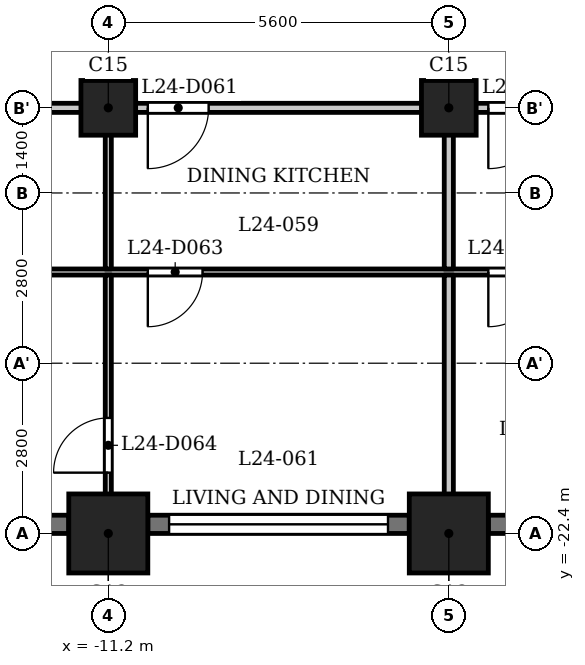
"""IFC4 building model, lengths in metres.
Left out: names, types, materials, properties, quantities, classifications, styles, units other than length and angle.
Written with IfcOpenShell. Run it as: python <this file> out.ifc"""

import sys

from ifc_helpers import new_model, si_unit, direction, frame, frame_2d, origin, origin_2d, place, context, subcontext, project, spatial, rectangle, extrude, element, fill, save


model = new_model("IFC4")
c1 = context("Model", 3, precision=1e-05, world=origin(), true_north=direction((0.0, 1.0)))
c2 = subcontext(c1, "Body", "Model", "MODEL_VIEW")
j1 = project(units=[si_unit("LENGTHUNIT", "METRE"), si_unit("PLANEANGLEUNIT", "RADIAN")], contexts=[c1])
p1 = place(None, origin())
s1 = spatial("IfcSite", under=j1, at=p1, CompositionType="ELEMENT")
p2 = place(p1, origin())
s2 = spatial("IfcBuilding", under=s1, at=p2, CompositionType="ELEMENT")
p3 = place(p2, frame((0.0, 0.0, 97.3)))
s3 = spatial("IfcBuildingStorey", under=s2, at=p3, CompositionType="ELEMENT", Elevation=97.3)
for number, where, z_axis, x_axis in (
    (1, (-11.2, -22.4, 0.0), (0.0, 0.0, 1.0), (1.0, 0.0, 0.0)),
    (2, (-5.6, -22.4, 0.0), (0.0, 0.0, 1.0), (1.0, 0.0, 0.0)),
):
    element("IfcColumn", number, at=place(p3, frame(where, z_axis=z_axis, x_axis=x_axis)), inside=s3, PredefinedType="COLUMN", context=c2, shape_type="SweptSolid", body=[
        extrude(rectangle(XDim=1.3, YDim=1.3, at=origin_2d()), origin(), (0.0, 0.0, 1.0), 3.5),
    ])
for number, where, z_axis, x_axis in (
    (3, (-11.2, -15.4, 0.0), (0.0, 0.0, 1.0), (1.0, 0.0, 0.0)),
    (4, (-5.6, -15.4, 0.0), (0.0, 0.0, 1.0), (1.0, 0.0, 0.0)),
):
    element("IfcColumn", number, at=place(p3, frame(where, z_axis=z_axis, x_axis=x_axis)), inside=s3, PredefinedType="COLUMN", context=c2, shape_type="SweptSolid", body=[
        extrude(rectangle(XDim=0.9, YDim=0.9, at=origin_2d()), origin(), (0.0, 0.0, 1.0), 3.5),
    ])
p4 = place(p3, frame((-16.15, -22.25, 0.0), z_axis=(0.0, 0.0, 1.0), x_axis=(1.0, 0.0, 0.0)))
e5 = element("IfcWall", 5, at=p4, inside=s3, PredefinedType="SOLIDWALL", context=c2, shape_type="SweptSolid", body=[
    extrude(rectangle(XDim=4.3, YDim=0.3, at=frame_2d((2.15, 0.0))), origin(), (0.0, 0.0, 1.0), 2.4),
])
p5 = place(p4, frame((0.35, 0.0, 1.2)))
e6 = element("IfcOpeningElement", 6, at=p5, cuts=e5, PredefinedType="OPENING", context=c2, shape_type="SweptSolid", body=[
    extrude(rectangle(XDim=3.6, YDim=0.95, at=frame_2d((1.8, 0.475))), frame((0.0, 0.16, 0.0), z_axis=(0.0, -1.0, 0.0), x_axis=(1.0, 0.0, 0.0)), (0.0, 0.0, 1.0), 0.32),
])
p6 = place(p3, frame((-10.55, -22.25, 0.0), z_axis=(0.0, 0.0, 1.0), x_axis=(1.0, 0.0, 0.0)))
e7 = element("IfcWall", 7, at=p6, inside=s3, PredefinedType="SOLIDWALL", context=c2, shape_type="SweptSolid", body=[
    extrude(rectangle(XDim=4.3, YDim=0.3, at=frame_2d((2.15, 0.0))), origin(), (0.0, 0.0, 1.0), 2.4),
])
p7 = place(p6, frame((0.35, 0.0, 1.2)))
e8 = element("IfcOpeningElement", 8, at=p7, cuts=e7, PredefinedType="OPENING", context=c2, shape_type="SweptSolid", body=[
    extrude(rectangle(XDim=3.6, YDim=0.95, at=frame_2d((1.8, 0.475))), frame((0.0, 0.16, 0.0), z_axis=(0.0, -1.0, 0.0), x_axis=(1.0, 0.0, 0.0)), (0.0, 0.0, 1.0), 0.32),
])
p8 = place(p3, frame((-4.95, -22.25, 0.0), z_axis=(0.0, 0.0, 1.0), x_axis=(1.0, 0.0, 0.0)))
e9 = element("IfcWall", 9, at=p8, inside=s3, PredefinedType="SOLIDWALL", context=c2, shape_type="SweptSolid", body=[
    extrude(rectangle(XDim=4.3, YDim=0.3, at=frame_2d((2.15, 0.0))), origin(), (0.0, 0.0, 1.0), 2.4),
])
p9 = place(p8, frame((0.35, 0.0, 1.2)))
e10 = element("IfcOpeningElement", 10, at=p9, cuts=e9, PredefinedType="OPENING", context=c2, shape_type="SweptSolid", body=[
    extrude(rectangle(XDim=3.6, YDim=0.95, at=frame_2d((1.8, 0.475))), frame((0.0, 0.16, 0.0), z_axis=(0.0, -1.0, 0.0), x_axis=(1.0, 0.0, 0.0)), (0.0, 0.0, 1.0), 0.32),
])
p10 = place(p3, frame((-26.19, -18.1, 0.0), z_axis=(0.0, 0.0, 1.0), x_axis=(1.0, 0.0, 0.0)))
e11 = element("IfcWall", 11, at=p10, inside=s3, PredefinedType="PARTITIONING", context=c2, shape_type="SweptSolid", body=[
    extrude(rectangle(XDim=52.63, YDim=0.1, at=frame_2d((26.315, 0.0))), origin(), (0.0, 0.0, 1.0), 3.2),
])
p11 = place(p10, frame((1.09, 0.0, 0.0)))
e12 = element("IfcOpeningElement", 12, at=p11, cuts=e11, PredefinedType="OPENING", context=c2, shape_type="SweptSolid", body=[
    extrude(rectangle(XDim=0.8, YDim=2.1, at=frame_2d((0.4, 1.05))), frame((0.0, 0.06, 0.0), z_axis=(0.0, -1.0, 0.0), x_axis=(1.0, 0.0, 0.0)), (0.0, 0.0, 1.0), 0.12),
])
p12 = place(p10, frame((4.44, 0.0, 0.0)))
e13 = element("IfcOpeningElement", 13, at=p12, cuts=e11, PredefinedType="OPENING", context=c2, shape_type="SweptSolid", body=[
    extrude(rectangle(XDim=0.9, YDim=2.1, at=frame_2d((0.45, 1.05))), frame((0.0, 0.06, 0.0), z_axis=(0.0, -1.0, 0.0), x_axis=(1.0, 0.0, 0.0)), (0.0, 0.0, 1.0), 0.12),
])
p13 = place(p10, frame((10.04, 0.0, 0.0)))
e14 = element("IfcOpeningElement", 14, at=p13, cuts=e11, PredefinedType="OPENING", context=c2, shape_type="SweptSolid", body=[
    extrude(rectangle(XDim=0.8, YDim=2.1, at=frame_2d((0.4, 1.05))), frame((0.0, 0.06, 0.0), z_axis=(0.0, -1.0, 0.0), x_axis=(1.0, 0.0, 0.0)), (0.0, 0.0, 1.0), 0.12),
])
p14 = place(p10, frame((15.64, 0.0, 0.0)))
e15 = element("IfcOpeningElement", 15, at=p14, cuts=e11, PredefinedType="OPENING", context=c2, shape_type="SweptSolid", body=[
    extrude(rectangle(XDim=0.9, YDim=2.1, at=frame_2d((0.45, 1.05))), frame((0.0, 0.06, 0.0), z_axis=(0.0, -1.0, 0.0), x_axis=(1.0, 0.0, 0.0)), (0.0, 0.0, 1.0), 0.12),
])
p15 = place(p10, frame((24.74, 0.0, 0.0)))
e16 = element("IfcOpeningElement", 16, at=p15, cuts=e11, PredefinedType="OPENING", context=c2, shape_type="SweptSolid", body=[
    extrude(rectangle(XDim=0.8, YDim=2.1, at=frame_2d((0.4, 1.05))), frame((0.0, 0.06, 0.0), z_axis=(0.0, -1.0, 0.0), x_axis=(1.0, 0.0, 0.0)), (0.0, 0.0, 1.0), 0.12),
])
p16 = place(p10, frame((21.24, 0.0, 0.0)))
e17 = element("IfcOpeningElement", 17, at=p16, cuts=e11, PredefinedType="OPENING", context=c2, shape_type="SweptSolid", body=[
    extrude(rectangle(XDim=0.9, YDim=2.1, at=frame_2d((0.45, 1.05))), frame((0.0, 0.06, 0.0), z_axis=(0.0, -1.0, 0.0), x_axis=(1.0, 0.0, 0.0)), (0.0, 0.0, 1.0), 0.12),
])
p17 = place(p10, frame((35.94, 0.0, 0.0)))
e18 = element("IfcOpeningElement", 18, at=p17, cuts=e11, PredefinedType="OPENING", context=c2, shape_type="SweptSolid", body=[
    extrude(rectangle(XDim=0.8, YDim=2.1, at=frame_2d((0.4, 1.05))), frame((0.0, 0.06, 0.0), z_axis=(0.0, -1.0, 0.0), x_axis=(1.0, 0.0, 0.0)), (0.0, 0.0, 1.0), 0.12),
])
p18 = place(p10, frame((33.19, 0.0, 0.0)))
e19 = element("IfcOpeningElement", 19, at=p18, cuts=e11, PredefinedType="OPENING", context=c2, shape_type="SweptSolid", body=[
    extrude(rectangle(XDim=0.9, YDim=2.1, at=frame_2d((0.45, 1.05))), frame((0.0, 0.06, 0.0), z_axis=(0.0, -1.0, 0.0), x_axis=(1.0, 0.0, 0.0)), (0.0, 0.0, 1.0), 0.12),
])
p19 = place(p10, frame((27.59, 0.0, 0.0)))
e20 = element("IfcOpeningElement", 20, at=p19, cuts=e11, PredefinedType="OPENING", context=c2, shape_type="SweptSolid", body=[
    extrude(rectangle(XDim=0.9, YDim=2.1, at=frame_2d((0.45, 1.05))), frame((0.0, 0.06, 0.0), z_axis=(0.0, -1.0, 0.0), x_axis=(1.0, 0.0, 0.0)), (0.0, 0.0, 1.0), 0.12),
])
p20 = place(p10, frame((29.64, 0.0, 0.0)))
e21 = element("IfcOpeningElement", 21, at=p20, cuts=e11, PredefinedType="OPENING", context=c2, shape_type="SweptSolid", body=[
    extrude(rectangle(XDim=0.9, YDim=2.1, at=frame_2d((0.45, 1.05))), frame((0.0, 0.06, 0.0), z_axis=(0.0, -1.0, 0.0), x_axis=(1.0, 0.0, 0.0)), (0.0, 0.0, 1.0), 0.12),
])
p21 = place(p10, frame((41.54, 0.0, 0.0)))
e22 = element("IfcOpeningElement", 22, at=p21, cuts=e11, PredefinedType="OPENING", context=c2, shape_type="SweptSolid", body=[
    extrude(rectangle(XDim=0.8, YDim=2.1, at=frame_2d((0.4, 1.05))), frame((0.0, 0.06, 0.0), z_axis=(0.0, -1.0, 0.0), x_axis=(1.0, 0.0, 0.0)), (0.0, 0.0, 1.0), 0.12),
])
p22 = place(p10, frame((38.54, 0.0, 0.0)))
e23 = element("IfcOpeningElement", 23, at=p22, cuts=e11, PredefinedType="OPENING", context=c2, shape_type="SweptSolid", body=[
    extrude(rectangle(XDim=0.9, YDim=2.1, at=frame_2d((0.45, 1.05))), frame((0.0, 0.06, 0.0), z_axis=(0.0, -1.0, 0.0), x_axis=(1.0, 0.0, 0.0)), (0.0, 0.0, 1.0), 0.12),
])
p23 = place(p10, frame((49.204, 0.0, 0.0)))
e24 = element("IfcOpeningElement", 24, at=p23, cuts=e11, PredefinedType="OPENING", context=c2, shape_type="SweptSolid", body=[
    extrude(rectangle(XDim=0.8, YDim=2.1, at=frame_2d((0.4, 1.05))), frame((0.0, 0.06, 0.0), z_axis=(0.0, -1.0, 0.0), x_axis=(1.0, 0.0, 0.0)), (0.0, 0.0, 1.0), 0.12),
])
p24 = place(p10, frame((43.64, 0.0, 0.0)))
e25 = element("IfcOpeningElement", 25, at=p24, cuts=e11, PredefinedType="OPENING", context=c2, shape_type="SweptSolid", body=[
    extrude(rectangle(XDim=0.9, YDim=2.1, at=frame_2d((0.45, 1.05))), frame((0.0, 0.06, 0.0), z_axis=(0.0, -1.0, 0.0), x_axis=(1.0, 0.0, 0.0)), (0.0, 0.0, 1.0), 0.12),
])
p25 = place(p3, frame((-27.484, -15.4, 0.0), z_axis=(0.0, 0.0, 1.0), x_axis=(1.0, 0.0, 0.0)))
e26 = element("IfcWall", 26, at=p25, inside=s3, PredefinedType="PARTITIONING", context=c2, shape_type="SweptSolid", body=[
    extrude(rectangle(XDim=54.968, YDim=0.15, at=frame_2d((27.484, 0.0))), origin(), (0.0, 0.0, 1.0), 3.2),
])
p26 = place(p25, frame((5.734, 0.0, 0.0)))
e27 = element("IfcOpeningElement", 27, at=p26, cuts=e26, PredefinedType="OPENING", context=c2, shape_type="SweptSolid", body=[
    extrude(rectangle(XDim=1.0, YDim=2.1, at=frame_2d((0.5, 1.05))), frame((0.0, 0.085, 0.0), z_axis=(0.0, -1.0, 0.0), x_axis=(1.0, 0.0, 0.0)), (0.0, 0.0, 1.0), 0.17),
])
p27 = place(p25, frame((16.934, 0.0, 0.0)))
e28 = element("IfcOpeningElement", 28, at=p27, cuts=e26, PredefinedType="OPENING", context=c2, shape_type="SweptSolid", body=[
    extrude(rectangle(XDim=1.0, YDim=2.1, at=frame_2d((0.5, 1.05))), frame((0.0, 0.085, 0.0), z_axis=(0.0, -1.0, 0.0), x_axis=(1.0, 0.0, 0.0)), (0.0, 0.0, 1.0), 0.17),
])
p28 = place(p25, frame((22.534, 0.0, 0.0)))
e29 = element("IfcOpeningElement", 29, at=p28, cuts=e26, PredefinedType="OPENING", context=c2, shape_type="SweptSolid", body=[
    extrude(rectangle(XDim=1.0, YDim=2.1, at=frame_2d((0.5, 1.05))), frame((0.0, 0.085, 0.0), z_axis=(0.0, -1.0, 0.0), x_axis=(1.0, 0.0, 0.0)), (0.0, 0.0, 1.0), 0.17),
])
p29 = place(p25, frame((31.384, 0.0, 0.0)))
e30 = element("IfcOpeningElement", 30, at=p29, cuts=e26, PredefinedType="OPENING", context=c2, shape_type="SweptSolid", body=[
    extrude(rectangle(XDim=1.0, YDim=2.1, at=frame_2d((0.5, 1.05))), frame((0.0, 0.085, 0.0), z_axis=(0.0, -1.0, 0.0), x_axis=(1.0, 0.0, 0.0)), (0.0, 0.0, 1.0), 0.17),
])
p30 = place(p25, frame((39.584, 0.0, 0.0)))
e31 = element("IfcOpeningElement", 31, at=p30, cuts=e26, PredefinedType="OPENING", context=c2, shape_type="SweptSolid", body=[
    extrude(rectangle(XDim=1.0, YDim=2.1, at=frame_2d((0.5, 1.05))), frame((0.0, 0.085, 0.0), z_axis=(0.0, -1.0, 0.0), x_axis=(1.0, 0.0, 0.0)), (0.0, 0.0, 1.0), 0.17),
])
p31 = place(p25, frame((44.934, 0.0, 0.0)))
e32 = element("IfcOpeningElement", 32, at=p31, cuts=e26, PredefinedType="OPENING", context=c2, shape_type="SweptSolid", body=[
    extrude(rectangle(XDim=1.0, YDim=2.1, at=frame_2d((0.5, 1.05))), frame((0.0, 0.085, 0.0), z_axis=(0.0, -1.0, 0.0), x_axis=(1.0, 0.0, 0.0)), (0.0, 0.0, 1.0), 0.17),
])
p32 = place(p3, frame((-11.2, -23.03, 0.0), z_axis=(0.0, 0.0, 1.0), x_axis=(0.0, 1.0, 0.0)))
e33 = element("IfcWall", 33, at=p32, inside=s3, PredefinedType="PARTITIONING", context=c2, shape_type="SweptSolid", body=[
    extrude(rectangle(XDim=4.88, YDim=0.1, at=frame_2d((2.44, 0.0))), origin(), (0.0, 0.0, 1.0), 3.2),
])
p33 = place(p32, frame((1.63, 0.0, 0.0)))
e34 = element("IfcOpeningElement", 34, at=p33, cuts=e33, PredefinedType="OPENING", context=c2, shape_type="SweptSolid", body=[
    extrude(rectangle(XDim=0.9, YDim=2.1, at=frame_2d((0.45, 1.05))), frame((0.0, 0.06, 0.0), z_axis=(0.0, -1.0, 0.0), x_axis=(1.0, 0.0, 0.0)), (0.0, 0.0, 1.0), 0.12),
])
p34 = place(p3, frame((-11.2, -18.05, 0.0), z_axis=(0.0, 0.0, 1.0), x_axis=(0.0, 1.0, 0.0)))
e35 = element("IfcWall", 35, at=p34, inside=s3, PredefinedType="PARTITIONING", context=c2, shape_type="SweptSolid", body=[
    extrude(rectangle(XDim=2.575, YDim=0.1, at=frame_2d((1.288, 0.0))), origin(), (0.0, 0.0, 1.0), 3.2),
])
p35 = place(p3, frame((-5.6, -23.03, 0.0), z_axis=(0.0, 0.0, 1.0), x_axis=(0.0, 1.0, 0.0)))
e36 = element("IfcWall", 36, at=p35, inside=s3, PredefinedType="PARTITIONING", context=c2, shape_type="SweptSolid", body=[
    extrude(rectangle(XDim=4.88, YDim=0.15, at=frame_2d((2.44, 0.0))), origin(), (0.0, 0.0, 1.0), 3.2),
])
p36 = place(p3, frame((-5.6, -18.05, 0.0), z_axis=(0.0, 0.0, 1.0), x_axis=(0.0, 1.0, 0.0)))
e37 = element("IfcWall", 37, at=p36, inside=s3, PredefinedType="PARTITIONING", context=c2, shape_type="SweptSolid", body=[
    extrude(rectangle(XDim=2.575, YDim=0.15, at=frame_2d((1.288, 0.0))), origin(), (0.0, 0.0, 1.0), 3.2),
])
p37 = place(p27, origin())
e38 = element("IfcDoor", 38, at=p37, inside=s3, OperationType="SINGLE_SWING_LEFT", PredefinedType="DOOR", context=c2, shape_type="SweptSolid", body=[
    extrude(rectangle(XDim=1.0, YDim=2.1, at=frame_2d((0.5, 1.05))), frame((0.0, 0.025, 0.0), z_axis=(0.0, -1.0, 0.0), x_axis=(1.0, 0.0, 0.0)), (0.0, 0.0, 1.0), 0.05),
])
fill(e28, e38)
p38 = place(p14, origin())
e39 = element("IfcDoor", 39, at=p38, inside=s3, OperationType="SINGLE_SWING_LEFT", PredefinedType="DOOR", context=c2, shape_type="SweptSolid", body=[
    extrude(rectangle(XDim=0.9, YDim=2.1, at=frame_2d((0.45, 1.05))), frame((0.0, 0.025, 0.0), z_axis=(0.0, -1.0, 0.0), x_axis=(1.0, 0.0, 0.0)), (0.0, 0.0, 1.0), 0.05),
])
fill(e15, e39)
p39 = place(p33, origin())
e40 = element("IfcDoor", 40, at=p39, inside=s3, OperationType="SINGLE_SWING_RIGHT", PredefinedType="DOOR", context=c2, shape_type="SweptSolid", body=[
    extrude(rectangle(XDim=0.9, YDim=2.1, at=frame_2d((0.45, 1.05))), frame((0.0, 0.025, 0.0), z_axis=(0.0, -1.0, 0.0), x_axis=(1.0, 0.0, 0.0)), (0.0, 0.0, 1.0), 0.05),
])
fill(e34, e40)
p40 = place(p28, origin())
e41 = element("IfcDoor", 41, at=p40, inside=s3, OperationType="SINGLE_SWING_LEFT", PredefinedType="DOOR", context=c2, shape_type="SweptSolid", body=[
    extrude(rectangle(XDim=1.0, YDim=2.1, at=frame_2d((0.5, 1.05))), frame((0.0, 0.025, 0.0), z_axis=(0.0, -1.0, 0.0), x_axis=(1.0, 0.0, 0.0)), (0.0, 0.0, 1.0), 0.05),
])
fill(e29, e41)
p41 = place(p16, origin())
e42 = element("IfcDoor", 42, at=p41, inside=s3, OperationType="SINGLE_SWING_LEFT", PredefinedType="DOOR", context=c2, shape_type="SweptSolid", body=[
    extrude(rectangle(XDim=0.9, YDim=2.1, at=frame_2d((0.45, 1.05))), frame((0.0, 0.025, 0.0), z_axis=(0.0, -1.0, 0.0), x_axis=(1.0, 0.0, 0.0)), (0.0, 0.0, 1.0), 0.05),
])
fill(e17, e42)
p42 = place(p7, origin())
e43 = element("IfcWindow", 43, at=p42, inside=s3, PartitioningType="SINGLE_PANEL", PredefinedType="WINDOW", context=c2, shape_type="SweptSolid", body=[
    extrude(rectangle(XDim=3.6, YDim=0.95, at=frame_2d((1.8, 0.475))), frame((0.0, 0.03, 0.0), z_axis=(0.0, -1.0, 0.0), x_axis=(1.0, 0.0, 0.0)), (0.0, 0.0, 1.0), 0.06),
])
fill(e8, e43)
save(model, sys.argv[1])
